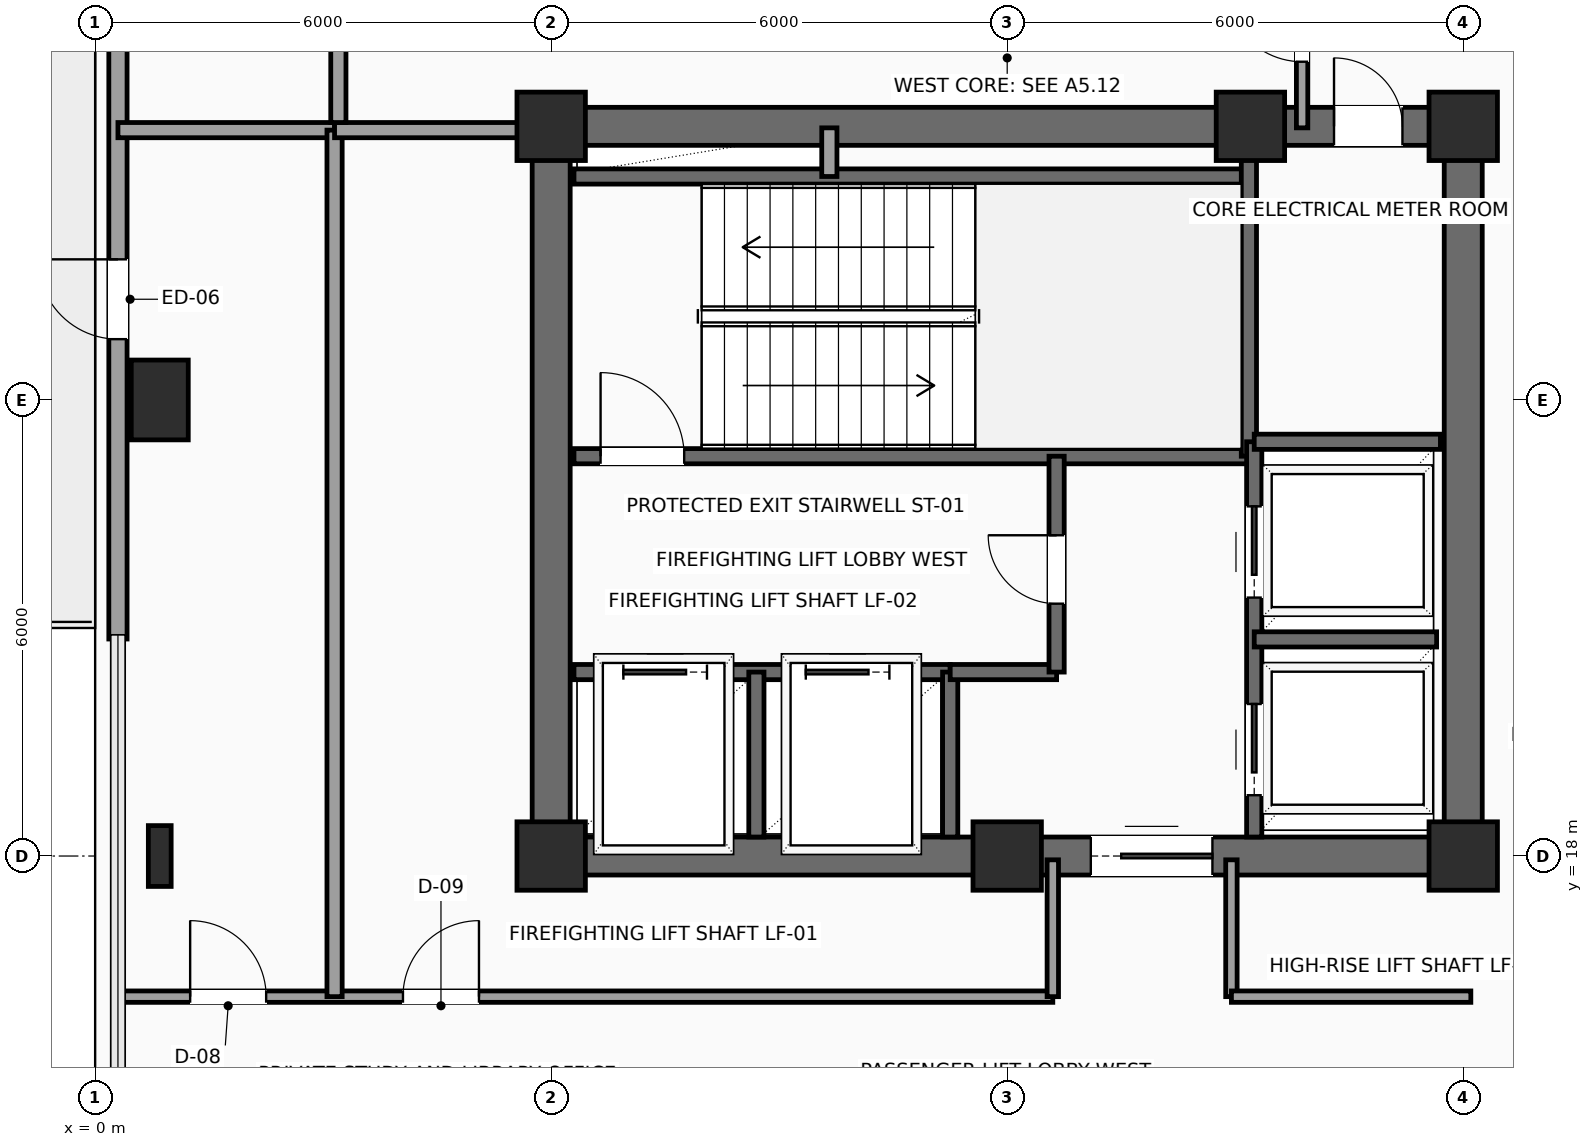
"""IFC4 building model, lengths in metres.
Left out: names, types, materials, properties, quantities, classifications, styles, units other than length and angle.
Written with IfcOpenShell. Run it as: python <this file> out.ifc"""

import sys

from ifc_helpers import new_model, si_unit, direction, frame, frame_2d, origin, origin_2d, place, context, subcontext, project, spatial, rectangle, i_section, extrude, element, fill, save


model = new_model("IFC4")
c1 = context("Model", 3, precision=1e-05, world=origin(), true_north=direction((0.0, 1.0)))
c2 = subcontext(c1, "Body", "Model", "MODEL_VIEW")
j1 = project(units=[si_unit("LENGTHUNIT", "METRE"), si_unit("PLANEANGLEUNIT", "RADIAN")], contexts=[c1])
p1 = place(None, origin())
s1 = spatial("IfcSite", under=j1, at=p1, CompositionType="ELEMENT")
p2 = place(p1, origin())
s2 = spatial("IfcBuilding", under=s1, at=p2, CompositionType="ELEMENT")
p3 = place(p2, frame((0.0, 0.0, 231.15)))
s3 = spatial("IfcBuildingStorey", under=s2, at=p3, CompositionType="ELEMENT", Elevation=231.15)
for number, where, z_axis, x_axis in (
    (1, (6.0, 18.0, 0.0), (0.0, 0.0, 1.0), (1.0, 0.0, 0.0)),
    (2, (12.0, 18.0, 0.0), (0.0, 0.0, 1.0), (1.0, 0.0, 0.0)),
    (3, (18.0, 18.0, 0.0), (0.0, 0.0, 1.0), (1.0, 0.0, 0.0)),
    (4, (6.0, 27.6, 0.0), (0.0, 0.0, 1.0), (1.0, 0.0, 0.0)),
    (5, (15.2, 27.6, 0.0), (0.0, 0.0, 1.0), (1.0, 0.0, 0.0)),
    (6, (18.0, 27.6, 0.0), (0.0, 0.0, 1.0), (1.0, 0.0, 0.0)),
):
    element("IfcColumn", number, at=place(p3, frame(where, z_axis=z_axis, x_axis=x_axis)), inside=s3, PredefinedType="COLUMN", context=c2, shape_type="SweptSolid", body=[
        extrude(rectangle(XDim=0.9, YDim=0.9, at=origin_2d()), origin(), (0.0, 0.0, 1.0), 3.75),
    ])
p4 = place(p3, frame((0.85, 18.0, 0.0), z_axis=(0.0, 0.0, 1.0), x_axis=(1.0, 0.0, 0.0)))
e7 = element("IfcColumn", 7, at=p4, inside=s3, PredefinedType="COLUMN", context=c2, shape_type="SweptSolid", body=[
    extrude(i_section(OverallWidth=0.3, OverallDepth=0.8, WebThickness=0.018, FlangeThickness=0.033, FilletRadius=0.03, at=origin_2d()), origin(), (0.0, 0.0, 1.0), 3.75),
])
p5 = place(p3, frame((0.85, 24.0, 0.0), z_axis=(0.0, 0.0, 1.0), x_axis=(1.0, 0.0, 0.0)))
e8 = element("IfcColumn", 8, at=p5, inside=s3, PredefinedType="COLUMN", context=c2, shape_type="SweptSolid", body=[
    extrude(rectangle(XDim=0.75, YDim=1.05, at=origin_2d()), origin(), (0.0, 0.0, 1.0), 3.75),
])
p6 = place(p3, frame((0.3, 20.855, 0.0), z_axis=(0.0, 0.0, 1.0), x_axis=(0.0, 1.0, 0.0)))
e9 = element("IfcWall", 9, at=p6, inside=s3, PredefinedType="SOLIDWALL", context=c2, shape_type="SweptSolid", body=[
    extrude(rectangle(XDim=9.29, YDim=0.24, at=frame_2d((4.645, 0.0))), origin(), (0.0, 0.0, 1.0), 3.425),
])
p7 = place(p6, frame((3.945, 0.0, 0.0)))
e10 = element("IfcOpeningElement", 10, at=p7, cuts=e9, PredefinedType="OPENING", context=c2, shape_type="SweptSolid", body=[
    extrude(rectangle(XDim=1.05, YDim=2.2, at=frame_2d((0.525, 1.1))), frame((0.0, 0.13, 0.0), z_axis=(0.0, -1.0, 0.0), x_axis=(1.0, 0.0, 0.0)), (0.0, 0.0, 1.0), 0.26),
])
p8 = place(p3, frame((6.0, 18.0, 0.0), z_axis=(0.0, 0.0, 1.0), x_axis=(1.0, 0.0, 0.0)))
e11 = element("IfcWall", 11, at=p8, inside=s3, PredefinedType="SHEAR", context=c2, shape_type="SweptSolid", body=[
    extrude(rectangle(XDim=12.0, YDim=0.5, at=frame_2d((6.0, 0.0))), origin(), (0.0, 0.0, 1.0), 3.425),
])
p9 = place(p8, frame((7.1, 0.0, 0.0)))
e12 = element("IfcOpeningElement", 12, at=p9, cuts=e11, PredefinedType="OPENING", context=c2, shape_type="SweptSolid", body=[
    extrude(rectangle(XDim=1.6, YDim=2.3, at=frame_2d((0.8, 1.15))), frame((0.0, 0.26, 0.0), z_axis=(0.0, -1.0, 0.0), x_axis=(1.0, 0.0, 0.0)), (0.0, 0.0, 1.0), 0.52),
])
p10 = place(p3, frame((6.0, 27.6, 0.0), z_axis=(0.0, 0.0, 1.0), x_axis=(1.0, 0.0, 0.0)))
e13 = element("IfcWall", 13, at=p10, inside=s3, PredefinedType="SHEAR", context=c2, shape_type="SweptSolid", body=[
    extrude(rectangle(XDim=12.0, YDim=0.5, at=frame_2d((6.0, 0.0))), origin(), (0.0, 0.0, 1.0), 3.425),
])
p11 = place(p10, frame((10.3, 0.0, 0.0)))
e14 = element("IfcOpeningElement", 14, at=p11, cuts=e13, PredefinedType="OPENING", context=c2, shape_type="SweptSolid", body=[
    extrude(rectangle(XDim=0.9, YDim=2.15, at=frame_2d((0.45, 1.075))), frame((0.0, 0.26, 0.0), z_axis=(0.0, -1.0, 0.0), x_axis=(1.0, 0.0, 0.0)), (0.0, 0.0, 1.0), 0.52),
])
for number, where, z_axis, x_axis in (
    (15, (6.0, 18.0, 0.0), (0.0, 0.0, 1.0), (0.0, 1.0, 0.0)),
    (16, (18.0, 18.0, 0.0), (0.0, 0.0, 1.0), (0.0, 1.0, 0.0)),
):
    element("IfcWall", number, at=place(p3, frame(where, z_axis=z_axis, x_axis=x_axis)), inside=s3, PredefinedType="SHEAR", context=c2, shape_type="SweptSolid", body=[
        extrude(rectangle(XDim=9.6, YDim=0.5, at=frame_2d((4.8, 0.0))), origin(), (0.0, 0.0, 1.0), 3.425),
    ])
p12 = place(p3, frame((6.3, 23.26, 0.0), z_axis=(0.0, 0.0, 1.0), x_axis=(1.0, 0.0, 0.0)))
e17 = element("IfcWall", 17, at=p12, inside=s3, PredefinedType="SHEAR", context=c2, shape_type="SweptSolid", body=[
    extrude(rectangle(XDim=8.88, YDim=0.2, at=frame_2d((4.44, 0.0))), origin(), (0.0, 0.0, 1.0), 3.425),
])
p13 = place(p12, frame((0.35, 0.0, 0.0)))
e18 = element("IfcOpeningElement", 18, at=p13, cuts=e17, PredefinedType="OPENING", context=c2, shape_type="SweptSolid", body=[
    extrude(rectangle(XDim=1.1, YDim=2.2, at=frame_2d((0.55, 1.1))), frame((0.0, 0.11, 0.0), z_axis=(0.0, -1.0, 0.0), x_axis=(1.0, 0.0, 0.0)), (0.0, 0.0, 1.0), 0.22),
])
p14 = place(p3, frame((6.3, 26.94, 0.0), z_axis=(0.0, 0.0, 1.0), x_axis=(1.0, 0.0, 0.0)))
e19 = element("IfcWall", 19, at=p14, inside=s3, PredefinedType="SHEAR", context=c2, shape_type="SweptSolid", body=[
    extrude(rectangle(XDim=8.88, YDim=0.2, at=frame_2d((4.44, 0.0))), origin(), (0.0, 0.0, 1.0), 3.425),
])
p15 = place(p3, frame((15.18, 23.26, 0.0), z_axis=(0.0, 0.0, 1.0), x_axis=(0.0, 1.0, 0.0)))
e20 = element("IfcWall", 20, at=p15, inside=s3, PredefinedType="SHEAR", context=c2, shape_type="SweptSolid", body=[
    extrude(rectangle(XDim=4.04, YDim=0.2, at=frame_2d((2.02, 0.0))), origin(), (0.0, 0.0, 1.0), 3.425),
])
p16 = place(p3, frame((6.3, 20.42, 0.0), z_axis=(0.0, 0.0, 1.0), x_axis=(1.0, 0.0, 0.0)))
e21 = element("IfcWall", 21, at=p16, inside=s3, PredefinedType="SHEAR", context=c2, shape_type="SweptSolid", body=[
    extrude(rectangle(XDim=4.95, YDim=0.2, at=frame_2d((2.475, 0.0))), origin(), (0.0, 0.0, 1.0), 3.425),
])
p17 = place(p16, frame((0.65, 0.0, 0.0)))
e22 = element("IfcOpeningElement", 22, at=p17, cuts=e21, PredefinedType="OPENING", context=c2, shape_type="SweptSolid", body=[
    extrude(rectangle(XDim=1.1, YDim=2.2, at=frame_2d((0.55, 1.1))), frame((0.0, 0.11, 0.0), z_axis=(0.0, -1.0, 0.0), x_axis=(1.0, 0.0, 0.0)), (0.0, 0.0, 1.0), 0.22),
])
p18 = place(p16, frame((3.05, 0.0, 0.0)))
e23 = element("IfcOpeningElement", 23, at=p18, cuts=e21, PredefinedType="OPENING", context=c2, shape_type="SweptSolid", body=[
    extrude(rectangle(XDim=1.1, YDim=2.2, at=frame_2d((0.55, 1.1))), frame((0.0, 0.11, 0.0), z_axis=(0.0, -1.0, 0.0), x_axis=(1.0, 0.0, 0.0)), (0.0, 0.0, 1.0), 0.22),
])
for number, where, z_axis, x_axis in (
    (24, (8.7, 18.25, 0.0), (0.0, 0.0, 1.0), (0.0, 1.0, 0.0)),
    (25, (11.25, 18.25, 0.0), (0.0, 0.0, 1.0), (0.0, 1.0, 0.0)),
):
    element("IfcWall", number, at=place(p3, frame(where, z_axis=z_axis, x_axis=x_axis)), inside=s3, PredefinedType="SHEAR", context=c2, shape_type="SweptSolid", body=[
        extrude(rectangle(XDim=2.17, YDim=0.2, at=frame_2d((1.085, 0.0))), origin(), (0.0, 0.0, 1.0), 3.425),
    ])
p19 = place(p3, frame((11.25, 20.42, 0.0), z_axis=(0.0, 0.0, 1.0), x_axis=(1.0, 0.0, 0.0)))
e26 = element("IfcWall", 26, at=p19, inside=s3, PredefinedType="SHEAR", context=c2, shape_type="SweptSolid", body=[
    extrude(rectangle(XDim=1.4, YDim=0.2, at=frame_2d((0.7, 0.0))), origin(), (0.0, 0.0, 1.0), 3.425),
])
p20 = place(p3, frame((12.65, 20.42, 0.0), z_axis=(0.0, 0.0, 1.0), x_axis=(0.0, 1.0, 0.0)))
e27 = element("IfcWall", 27, at=p20, inside=s3, PredefinedType="SHEAR", context=c2, shape_type="SweptSolid", body=[
    extrude(rectangle(XDim=2.84, YDim=0.2, at=frame_2d((1.42, 0.0))), origin(), (0.0, 0.0, 1.0), 3.425),
])
p21 = place(p20, frame((0.9, 0.0, 0.0)))
e28 = element("IfcOpeningElement", 28, at=p21, cuts=e27, PredefinedType="OPENING", context=c2, shape_type="SweptSolid", body=[
    extrude(rectangle(XDim=0.9, YDim=2.15, at=frame_2d((0.45, 1.075))), frame((0.0, 0.11, 0.0), z_axis=(0.0, -1.0, 0.0), x_axis=(1.0, 0.0, 0.0)), (0.0, 0.0, 1.0), 0.22),
])
p22 = place(p3, frame((9.66, 26.94, 0.0), z_axis=(0.0, 0.0, 1.0), x_axis=(0.0, 1.0, 0.0)))
e29 = element("IfcWall", 29, at=p22, inside=s3, PredefinedType="SOLIDWALL", context=c2, shape_type="SweptSolid", body=[
    extrude(rectangle(XDim=0.64, YDim=0.2, at=frame_2d((0.32, 0.0))), origin(), (0.0, 0.0, 1.0), 3.425),
])
p23 = place(p3, frame((15.25, 18.25, 0.0), z_axis=(0.0, 0.0, 1.0), x_axis=(0.0, 1.0, 0.0)))
e30 = element("IfcWall", 30, at=p23, inside=s3, PredefinedType="SHEAR", context=c2, shape_type="SweptSolid", body=[
    extrude(rectangle(XDim=5.2, YDim=0.2, at=frame_2d((2.6, 0.0))), origin(), (0.0, 0.0, 1.0), 3.425),
])
p24 = place(p23, frame((0.55, 0.0, 0.0)))
e31 = element("IfcOpeningElement", 31, at=p24, cuts=e30, PredefinedType="OPENING", context=c2, shape_type="SweptSolid", body=[
    extrude(rectangle(XDim=1.2, YDim=2.2, at=frame_2d((0.6, 1.1))), frame((0.0, 0.11, 0.0), z_axis=(0.0, -1.0, 0.0), x_axis=(1.0, 0.0, 0.0)), (0.0, 0.0, 1.0), 0.22),
])
p25 = place(p23, frame((3.15, 0.0, 0.0)))
e32 = element("IfcOpeningElement", 32, at=p25, cuts=e30, PredefinedType="OPENING", context=c2, shape_type="SweptSolid", body=[
    extrude(rectangle(XDim=1.2, YDim=2.2, at=frame_2d((0.6, 1.1))), frame((0.0, 0.11, 0.0), z_axis=(0.0, -1.0, 0.0), x_axis=(1.0, 0.0, 0.0)), (0.0, 0.0, 1.0), 0.22),
])
p26 = place(p3, frame((15.25, 20.85, 0.0), z_axis=(0.0, 0.0, 1.0), x_axis=(1.0, 0.0, 0.0)))
e33 = element("IfcWall", 33, at=p26, inside=s3, PredefinedType="SHEAR", context=c2, shape_type="SweptSolid", body=[
    extrude(rectangle(XDim=2.4, YDim=0.2, at=frame_2d((1.2, 0.0))), origin(), (0.0, 0.0, 1.0), 3.425),
])
p27 = place(p3, frame((15.25, 23.45, 0.0), z_axis=(0.0, 0.0, 1.0), x_axis=(1.0, 0.0, 0.0)))
e34 = element("IfcWall", 34, at=p27, inside=s3, PredefinedType="SHEAR", context=c2, shape_type="SweptSolid", body=[
    extrude(rectangle(XDim=2.45, YDim=0.2, at=frame_2d((1.225, 0.0))), origin(), (0.0, 0.0, 1.0), 3.425),
])
p28 = place(p3, frame((0.3, 16.15, 0.0), z_axis=(0.0, 0.0, 1.0), x_axis=(1.0, 0.0, 0.0)))
e35 = element("IfcWall", 35, at=p28, inside=s3, PredefinedType="PARTITIONING", context=c2, shape_type="SweptSolid", body=[
    extrude(rectangle(XDim=12.3, YDim=0.15, at=frame_2d((6.15, 0.0))), origin(), (0.0, 0.0, 1.0), 3.425),
])
p29 = place(p28, frame((0.95, 0.0, 0.0)))
e36 = element("IfcOpeningElement", 36, at=p29, cuts=e35, PredefinedType="OPENING", context=c2, shape_type="SweptSolid", body=[
    extrude(rectangle(XDim=1.0, YDim=2.2, at=frame_2d((0.5, 1.1))), frame((0.0, 0.085, 0.0), z_axis=(0.0, -1.0, 0.0), x_axis=(1.0, 0.0, 0.0)), (0.0, 0.0, 1.0), 0.17),
])
p30 = place(p28, frame((3.75, 0.0, 0.0)))
e37 = element("IfcOpeningElement", 37, at=p30, cuts=e35, PredefinedType="OPENING", context=c2, shape_type="SweptSolid", body=[
    extrude(rectangle(XDim=1.0, YDim=2.2, at=frame_2d((0.5, 1.1))), frame((0.0, 0.085, 0.0), z_axis=(0.0, -1.0, 0.0), x_axis=(1.0, 0.0, 0.0)), (0.0, 0.0, 1.0), 0.17),
])
for number, where, z_axis, x_axis in (
    (38, (12.6, 16.15, 0.0), (0.0, 0.0, 1.0), (0.0, 1.0, 0.0)),
    (39, (14.95, 17.95, 0.0), (0.0, 0.0, 1.0), (0.0, -1.0, 0.0)),
):
    element("IfcWall", number, at=place(p3, frame(where, z_axis=z_axis, x_axis=x_axis)), inside=s3, PredefinedType="PARTITIONING", context=c2, shape_type="SweptSolid", body=[
        extrude(rectangle(XDim=1.8, YDim=0.15, at=frame_2d((0.9, 0.0))), origin(), (0.0, 0.0, 1.0), 3.425),
    ])
p31 = place(p3, frame((14.95, 16.15, 0.0), z_axis=(0.0, 0.0, 1.0), x_axis=(1.0, 0.0, 0.0)))
e40 = element("IfcWall", 40, at=p31, inside=s3, PredefinedType="PARTITIONING", context=c2, shape_type="SweptSolid", body=[
    extrude(rectangle(XDim=3.15, YDim=0.15, at=frame_2d((1.575, 0.0))), origin(), (0.0, 0.0, 1.0), 3.425),
])
p32 = place(p3, frame((15.88, 27.58, 0.0), z_axis=(0.0, 0.0, 1.0), x_axis=(0.0, 1.0, 0.0)))
e41 = element("IfcWall", 41, at=p32, inside=s3, PredefinedType="PARTITIONING", context=c2, shape_type="SweptSolid", body=[
    extrude(rectangle(XDim=2.67, YDim=0.15, at=frame_2d((1.335, 0.0))), origin(), (0.0, 0.0, 1.0), 3.425),
])
p33 = place(p32, frame((0.87, 0.0, 0.0)))
e42 = element("IfcOpeningElement", 42, at=p33, cuts=e41, PredefinedType="OPENING", context=c2, shape_type="SweptSolid", body=[
    extrude(rectangle(XDim=1.0, YDim=2.2, at=frame_2d((0.5, 1.1))), frame((0.0, 0.085, 0.0), z_axis=(0.0, -1.0, 0.0), x_axis=(1.0, 0.0, 0.0)), (0.0, 0.0, 1.0), 0.17),
])
p34 = place(p3, frame((0.3, 27.55, 0.0), z_axis=(0.0, 0.0, 1.0), x_axis=(1.0, 0.0, 0.0)))
e43 = element("IfcWall", 43, at=p34, inside=s3, PredefinedType="PARTITIONING", context=c2, shape_type="SweptSolid", body=[
    extrude(rectangle(XDim=2.85, YDim=0.2, at=frame_2d((1.425, 0.0))), origin(), (0.0, 0.0, 1.0), 3.425),
])
p35 = place(p3, frame((3.15, 16.15, 0.0), z_axis=(0.0, 0.0, 1.0), x_axis=(0.0, 1.0, 0.0)))
e44 = element("IfcWall", 44, at=p35, inside=s3, PredefinedType="PARTITIONING", context=c2, shape_type="SweptSolid", body=[
    extrude(rectangle(XDim=11.4, YDim=0.2, at=frame_2d((5.7, 0.0))), origin(), (0.0, 0.0, 1.0), 3.425),
])
p36 = place(p3, frame((3.15, 27.55, 0.0), z_axis=(0.0, 0.0, 1.0), x_axis=(1.0, 0.0, 0.0)))
e45 = element("IfcWall", 45, at=p36, inside=s3, PredefinedType="PARTITIONING", context=c2, shape_type="SweptSolid", body=[
    extrude(rectangle(XDim=2.8, YDim=0.2, at=frame_2d((1.4, 0.0))), origin(), (0.0, 0.0, 1.0), 3.425),
])
p37 = place(p3, frame((3.2, 27.65, 0.0), z_axis=(0.0, 0.0, 1.0), x_axis=(0.0, 1.0, 0.0)))
e46 = element("IfcWall", 46, at=p37, inside=s3, PredefinedType="PARTITIONING", context=c2, shape_type="SweptSolid", body=[
    extrude(rectangle(XDim=3.55, YDim=0.2, at=frame_2d((1.775, 0.0))), origin(), (0.0, 0.0, 1.0), 3.425),
])
p38 = place(p7, origin())
e47 = element("IfcDoor", 47, at=p38, inside=s3, OperationType="SINGLE_SWING_RIGHT", PredefinedType="DOOR", context=c2, shape_type="SweptSolid", body=[
    extrude(rectangle(XDim=1.05, YDim=2.2, at=frame_2d((0.525, 1.1))), frame((0.0, 0.025, 0.0), z_axis=(0.0, -1.0, 0.0), x_axis=(1.0, 0.0, 0.0)), (0.0, 0.0, 1.0), 0.05),
])
fill(e10, e47)
p39 = place(p9, origin())
e48 = element("IfcDoor", 48, at=p39, inside=s3, OperationType="DOUBLE_DOOR_SLIDING", PredefinedType="DOOR", context=c2, shape_type="SweptSolid", body=[
    extrude(rectangle(XDim=1.6, YDim=2.3, at=frame_2d((0.8, 1.15))), frame((0.0, 0.025, 0.0), z_axis=(0.0, -1.0, 0.0), x_axis=(1.0, 0.0, 0.0)), (0.0, 0.0, 1.0), 0.05),
])
fill(e12, e48)
p40 = place(p11, origin())
e49 = element("IfcDoor", 49, at=p40, inside=s3, OperationType="SINGLE_SWING_LEFT", PredefinedType="DOOR", context=c2, shape_type="SweptSolid", body=[
    extrude(rectangle(XDim=0.9, YDim=2.15, at=frame_2d((0.45, 1.075))), frame((0.0, 0.025, 0.0), z_axis=(0.0, -1.0, 0.0), x_axis=(1.0, 0.0, 0.0)), (0.0, 0.0, 1.0), 0.05),
])
fill(e14, e49)
p41 = place(p13, origin())
e50 = element("IfcDoor", 50, at=p41, inside=s3, OperationType="SINGLE_SWING_LEFT", PredefinedType="DOOR", context=c2, shape_type="SweptSolid", body=[
    extrude(rectangle(XDim=1.1, YDim=2.2, at=frame_2d((0.55, 1.1))), frame((0.0, 0.025, 0.0), z_axis=(0.0, -1.0, 0.0), x_axis=(1.0, 0.0, 0.0)), (0.0, 0.0, 1.0), 0.05),
])
fill(e18, e50)
p42 = place(p17, origin())
e51 = element("IfcDoor", 51, at=p42, inside=s3, OperationType="SLIDING_TO_LEFT", PredefinedType="DOOR", context=c2, shape_type="SweptSolid", body=[
    extrude(rectangle(XDim=1.1, YDim=2.2, at=frame_2d((0.55, 1.1))), frame((0.0, 0.025, 0.0), z_axis=(0.0, -1.0, 0.0), x_axis=(1.0, 0.0, 0.0)), (0.0, 0.0, 1.0), 0.05),
])
fill(e22, e51)
p43 = place(p18, origin())
e52 = element("IfcDoor", 52, at=p43, inside=s3, OperationType="SLIDING_TO_LEFT", PredefinedType="DOOR", context=c2, shape_type="SweptSolid", body=[
    extrude(rectangle(XDim=1.1, YDim=2.2, at=frame_2d((0.55, 1.1))), frame((0.0, 0.025, 0.0), z_axis=(0.0, -1.0, 0.0), x_axis=(1.0, 0.0, 0.0)), (0.0, 0.0, 1.0), 0.05),
])
fill(e23, e52)
p44 = place(p21, origin())
e53 = element("IfcDoor", 53, at=p44, inside=s3, OperationType="SINGLE_SWING_RIGHT", PredefinedType="DOOR", context=c2, shape_type="SweptSolid", body=[
    extrude(rectangle(XDim=0.9, YDim=2.15, at=frame_2d((0.45, 1.075))), frame((0.0, 0.025, 0.0), z_axis=(0.0, -1.0, 0.0), x_axis=(1.0, 0.0, 0.0)), (0.0, 0.0, 1.0), 0.05),
])
fill(e28, e53)
p45 = place(p24, origin())
e54 = element("IfcDoor", 54, at=p45, inside=s3, OperationType="SLIDING_TO_RIGHT", PredefinedType="DOOR", context=c2, shape_type="SweptSolid", body=[
    extrude(rectangle(XDim=1.2, YDim=2.2, at=frame_2d((0.6, 1.1))), frame((0.0, 0.025, 0.0), z_axis=(0.0, -1.0, 0.0), x_axis=(1.0, 0.0, 0.0)), (0.0, 0.0, 1.0), 0.05),
])
fill(e31, e54)
p46 = place(p25, origin())
e55 = element("IfcDoor", 55, at=p46, inside=s3, OperationType="SLIDING_TO_RIGHT", PredefinedType="DOOR", context=c2, shape_type="SweptSolid", body=[
    extrude(rectangle(XDim=1.2, YDim=2.2, at=frame_2d((0.6, 1.1))), frame((0.0, 0.025, 0.0), z_axis=(0.0, -1.0, 0.0), x_axis=(1.0, 0.0, 0.0)), (0.0, 0.0, 1.0), 0.05),
])
fill(e32, e55)
p47 = place(p29, origin())
e56 = element("IfcDoor", 56, at=p47, inside=s3, OperationType="SINGLE_SWING_LEFT", PredefinedType="DOOR", context=c2, shape_type="SweptSolid", body=[
    extrude(rectangle(XDim=1.0, YDim=2.2, at=frame_2d((0.5, 1.1))), frame((0.0, 0.025, 0.0), z_axis=(0.0, -1.0, 0.0), x_axis=(1.0, 0.0, 0.0)), (0.0, 0.0, 1.0), 0.05),
])
fill(e36, e56)
p48 = place(p30, origin())
e57 = element("IfcDoor", 57, at=p48, inside=s3, OperationType="SINGLE_SWING_RIGHT", PredefinedType="DOOR", context=c2, shape_type="SweptSolid", body=[
    extrude(rectangle(XDim=1.0, YDim=2.2, at=frame_2d((0.5, 1.1))), frame((0.0, 0.025, 0.0), z_axis=(0.0, -1.0, 0.0), x_axis=(1.0, 0.0, 0.0)), (0.0, 0.0, 1.0), 0.05),
])
fill(e37, e57)
p49 = place(p33, origin())
e58 = element("IfcDoor", 58, at=p49, inside=s3, OperationType="SINGLE_SWING_RIGHT", PredefinedType="DOOR", context=c2, shape_type="SweptSolid", body=[
    extrude(rectangle(XDim=1.0, YDim=2.2, at=frame_2d((0.5, 1.1))), frame((0.0, 0.025, 0.0), z_axis=(0.0, -1.0, 0.0), x_axis=(1.0, 0.0, 0.0)), (0.0, 0.0, 1.0), 0.05),
])
fill(e42, e58)
save(model, sys.argv[1])
